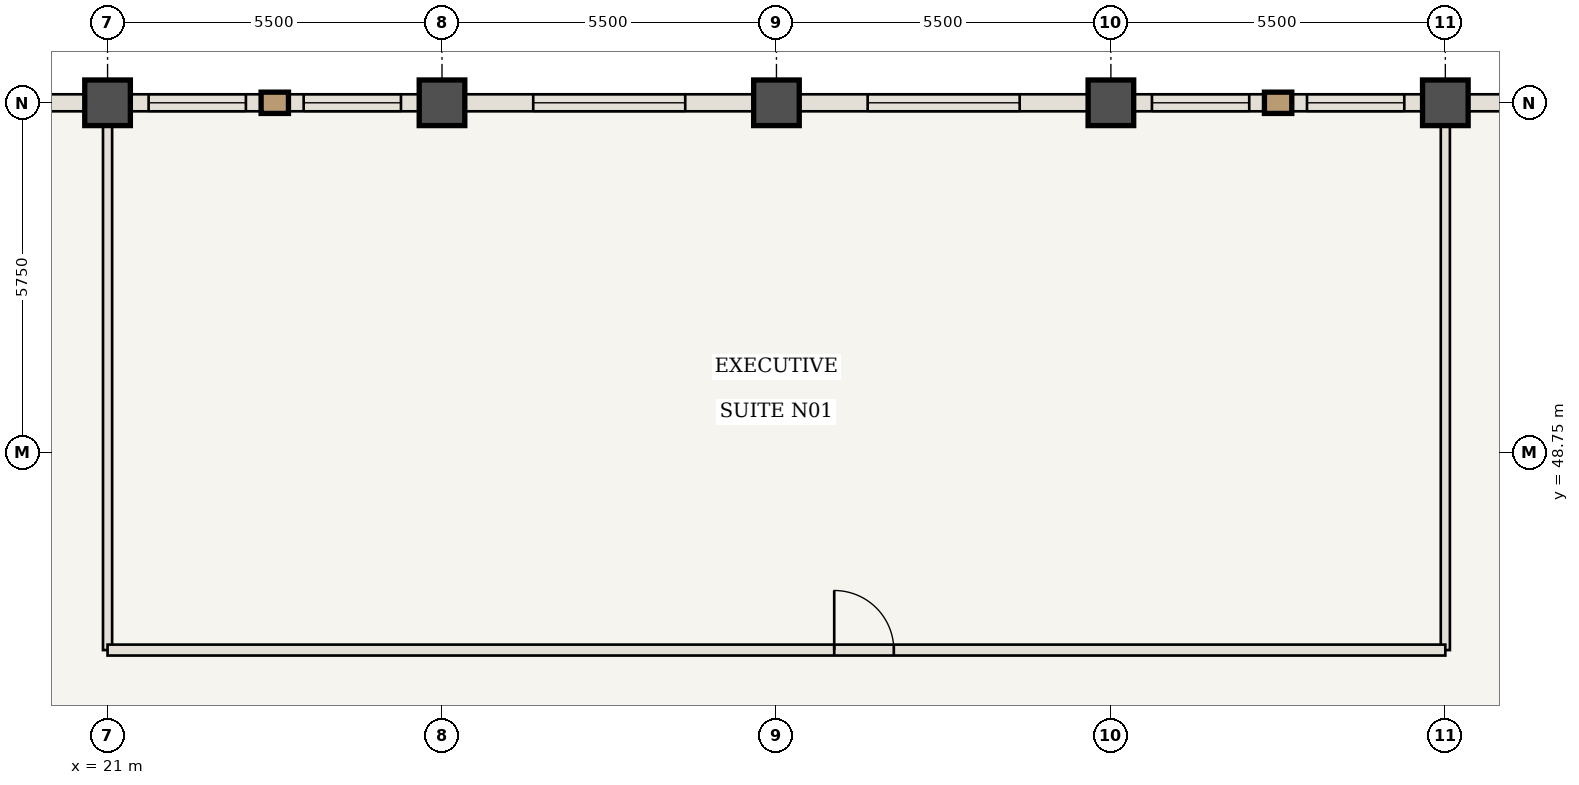
"""IFC4 building model, lengths in metres.
Left out: names, types, materials, properties, quantities, classifications, styles, units other than length and angle.
Written with IfcOpenShell. Run it as: python <this file> out.ifc"""

import sys

from ifc_helpers import new_model, si_unit, direction, frame, frame_2d, origin, origin_2d, place, context, subcontext, project, spatial, rectangle, extrude, element, fill, save


model = new_model("IFC4")
c1 = context("Model", 3, precision=1e-05, world=origin(), true_north=direction((0.0, 1.0)))
c2 = subcontext(c1, "Body", "Model", "MODEL_VIEW")
j1 = project(units=[si_unit("LENGTHUNIT", "METRE"), si_unit("PLANEANGLEUNIT", "RADIAN")], contexts=[c1])
p1 = place(None, origin())
s1 = spatial("IfcSite", under=j1, at=p1, CompositionType="ELEMENT")
p2 = place(p1, origin())
s2 = spatial("IfcBuilding", under=s1, at=p2, CompositionType="ELEMENT")
p3 = place(p2, frame((0.0, 0.0, 300.65)))
s3 = spatial("IfcBuildingStorey", under=s2, at=p3, CompositionType="ELEMENT", Elevation=300.65)
for number, where, z_axis, x_axis in (
    (1, (21.0, 54.5, 0.0), (0.0, 0.0, 1.0), (1.0, 0.0, 0.0)),
    (2, (26.5, 54.5, 0.0), (0.0, 0.0, 1.0), (1.0, 0.0, 0.0)),
    (3, (32.0, 54.5, 0.0), (0.0, 0.0, 1.0), (1.0, 0.0, 0.0)),
    (4, (37.5, 54.5, 0.0), (0.0, 0.0, 1.0), (1.0, 0.0, 0.0)),
    (5, (43.0, 54.5, 0.0), (0.0, 0.0, 1.0), (1.0, 0.0, 0.0)),
):
    element("IfcColumn", number, at=place(p3, frame(where, z_axis=z_axis, x_axis=x_axis)), inside=s3, PredefinedType="COLUMN", context=c2, shape_type="SweptSolid", body=[
        extrude(rectangle(XDim=0.75, YDim=0.75, at=origin_2d()), origin(), (0.0, 0.0, 1.0), 3.85),
    ])
for number, where, z_axis, x_axis in (
    (6, (21.0, 45.5, 0.0), (0.0, 0.0, 1.0), (0.0, 1.0, 0.0)),
    (7, (43.0, 45.5, 0.0), (0.0, 0.0, 1.0), (0.0, 1.0, 0.0)),
):
    element("IfcWall", number, at=place(p3, frame(where, z_axis=z_axis, x_axis=x_axis)), inside=s3, PredefinedType="STANDARD", context=c2, shape_type="SweptSolid", body=[
        extrude(rectangle(XDim=8.94, YDim=0.15, at=frame_2d((4.47, 0.0))), origin(), (0.0, 0.0, 1.0), 3.685),
    ])
p4 = place(p3, frame((21.0, 45.5, 0.0), z_axis=(0.0, 0.0, 1.0), x_axis=(1.0, 0.0, 0.0)))
e8 = element("IfcWall", 8, at=p4, inside=s3, PredefinedType="STANDARD", context=c2, shape_type="SweptSolid", body=[
    extrude(rectangle(XDim=22.0, YDim=0.18, at=frame_2d((11.0, 0.0))), origin(), (0.0, 0.0, 1.0), 3.685),
])
p5 = place(p4, frame((11.95, 0.0, 0.0)))
e9 = element("IfcOpeningElement", 9, at=p5, cuts=e8, PredefinedType="OPENING", context=c2, shape_type="SweptSolid", body=[
    extrude(rectangle(XDim=0.98, YDim=2.2, at=frame_2d((0.49, 1.1))), frame((0.0, 0.1, 0.0), z_axis=(0.0, -1.0, 0.0), x_axis=(1.0, 0.0, 0.0)), (0.0, 0.0, 1.0), 0.2),
])
p6 = place(p3, frame((15.5, 54.5, 0.0), z_axis=(0.0, 0.0, 1.0), x_axis=(1.0, 0.0, 0.0)))
e10 = element("IfcWall", 10, at=p6, inside=s3, PredefinedType="USERDEFINED", context=c2, shape_type="SweptSolid", body=[
    extrude(rectangle(XDim=5.5, YDim=0.28, at=frame_2d((2.75, 0.0))), origin(), (0.0, 0.0, 1.0), 2.985),
])
p7 = place(p3, frame((21.0, 54.5, 0.0), z_axis=(0.0, 0.0, 1.0), x_axis=(1.0, 0.0, 0.0)))
e11 = element("IfcWall", 11, at=p7, inside=s3, PredefinedType="USERDEFINED", context=c2, shape_type="SweptSolid", body=[
    extrude(rectangle(XDim=5.5, YDim=0.28, at=frame_2d((2.75, 0.0))), origin(), (0.0, 0.0, 1.0), 2.985),
])
p8 = place(p7, frame((0.675, 0.0, 0.85)))
e12 = element("IfcOpeningElement", 12, at=p8, cuts=e11, PredefinedType="OPENING", context=c2, shape_type="SweptSolid", body=[
    extrude(rectangle(XDim=1.6, YDim=1.935, at=frame_2d((0.8, 0.968))), frame((0.0, 0.15, 0.0), z_axis=(0.0, -1.0, 0.0), x_axis=(1.0, 0.0, 0.0)), (0.0, 0.0, 1.0), 0.3),
])
p9 = place(p7, frame((3.225, 0.0, 0.85)))
e13 = element("IfcOpeningElement", 13, at=p9, cuts=e11, PredefinedType="OPENING", context=c2, shape_type="SweptSolid", body=[
    extrude(rectangle(XDim=1.6, YDim=1.935, at=frame_2d((0.8, 0.968))), frame((0.0, 0.15, 0.0), z_axis=(0.0, -1.0, 0.0), x_axis=(1.0, 0.0, 0.0)), (0.0, 0.0, 1.0), 0.3),
])
p10 = place(p3, frame((26.5, 54.5, 0.0), z_axis=(0.0, 0.0, 1.0), x_axis=(1.0, 0.0, 0.0)))
e14 = element("IfcWall", 14, at=p10, inside=s3, PredefinedType="USERDEFINED", context=c2, shape_type="SweptSolid", body=[
    extrude(rectangle(XDim=5.5, YDim=0.28, at=frame_2d((2.75, 0.0))), origin(), (0.0, 0.0, 1.0), 2.985),
])
p11 = place(p10, frame((1.5, 0.0, 0.85)))
e15 = element("IfcOpeningElement", 15, at=p11, cuts=e14, PredefinedType="OPENING", context=c2, shape_type="SweptSolid", body=[
    extrude(rectangle(XDim=2.5, YDim=1.935, at=frame_2d((1.25, 0.968))), frame((0.0, 0.15, 0.0), z_axis=(0.0, -1.0, 0.0), x_axis=(1.0, 0.0, 0.0)), (0.0, 0.0, 1.0), 0.3),
])
p12 = place(p3, frame((32.0, 54.5, 0.0), z_axis=(0.0, 0.0, 1.0), x_axis=(1.0, 0.0, 0.0)))
e16 = element("IfcWall", 16, at=p12, inside=s3, PredefinedType="USERDEFINED", context=c2, shape_type="SweptSolid", body=[
    extrude(rectangle(XDim=5.5, YDim=0.28, at=frame_2d((2.75, 0.0))), origin(), (0.0, 0.0, 1.0), 2.985),
])
p13 = place(p12, frame((1.5, 0.0, 0.85)))
e17 = element("IfcOpeningElement", 17, at=p13, cuts=e16, PredefinedType="OPENING", context=c2, shape_type="SweptSolid", body=[
    extrude(rectangle(XDim=2.5, YDim=1.935, at=frame_2d((1.25, 0.968))), frame((0.0, 0.15, 0.0), z_axis=(0.0, -1.0, 0.0), x_axis=(1.0, 0.0, 0.0)), (0.0, 0.0, 1.0), 0.3),
])
p14 = place(p3, frame((37.5, 54.5, 0.0), z_axis=(0.0, 0.0, 1.0), x_axis=(1.0, 0.0, 0.0)))
e18 = element("IfcWall", 18, at=p14, inside=s3, PredefinedType="USERDEFINED", context=c2, shape_type="SweptSolid", body=[
    extrude(rectangle(XDim=5.5, YDim=0.28, at=frame_2d((2.75, 0.0))), origin(), (0.0, 0.0, 1.0), 2.985),
])
p15 = place(p14, frame((0.675, 0.0, 0.85)))
e19 = element("IfcOpeningElement", 19, at=p15, cuts=e18, PredefinedType="OPENING", context=c2, shape_type="SweptSolid", body=[
    extrude(rectangle(XDim=1.6, YDim=1.935, at=frame_2d((0.8, 0.968))), frame((0.0, 0.15, 0.0), z_axis=(0.0, -1.0, 0.0), x_axis=(1.0, 0.0, 0.0)), (0.0, 0.0, 1.0), 0.3),
])
p16 = place(p14, frame((3.225, 0.0, 0.85)))
e20 = element("IfcOpeningElement", 20, at=p16, cuts=e18, PredefinedType="OPENING", context=c2, shape_type="SweptSolid", body=[
    extrude(rectangle(XDim=1.6, YDim=1.935, at=frame_2d((0.8, 0.968))), frame((0.0, 0.15, 0.0), z_axis=(0.0, -1.0, 0.0), x_axis=(1.0, 0.0, 0.0)), (0.0, 0.0, 1.0), 0.3),
])
p17 = place(p3, frame((43.0, 54.5, 0.0), z_axis=(0.0, 0.0, 1.0), x_axis=(1.0, 0.0, 0.0)))
e21 = element("IfcWall", 21, at=p17, inside=s3, PredefinedType="USERDEFINED", context=c2, shape_type="SweptSolid", body=[
    extrude(rectangle(XDim=5.5, YDim=0.28, at=frame_2d((2.75, 0.0))), origin(), (0.0, 0.0, 1.0), 2.985),
])
p18 = place(p5, origin())
e22 = element("IfcDoor", 22, at=p18, inside=s3, OperationType="SINGLE_SWING_LEFT", PredefinedType="DOOR", context=c2, shape_type="SweptSolid", body=[
    extrude(rectangle(XDim=0.98, YDim=2.2, at=frame_2d((0.49, 1.1))), frame((0.0, 0.025, 0.0), z_axis=(0.0, -1.0, 0.0), x_axis=(1.0, 0.0, 0.0)), (0.0, 0.0, 1.0), 0.05),
])
fill(e9, e22)
p19 = place(p8, origin())
e23 = element("IfcWindow", 23, at=p19, inside=s3, PartitioningType="SINGLE_PANEL", PredefinedType="WINDOW", context=c2, shape_type="SweptSolid", body=[
    extrude(rectangle(XDim=1.6, YDim=1.935, at=frame_2d((0.8, 0.968))), frame((0.0, 0.03, 0.0), z_axis=(0.0, -1.0, 0.0), x_axis=(1.0, 0.0, 0.0)), (0.0, 0.0, 1.0), 0.06),
])
fill(e12, e23)
p20 = place(p9, origin())
e24 = element("IfcWindow", 24, at=p20, inside=s3, PartitioningType="SINGLE_PANEL", PredefinedType="WINDOW", context=c2, shape_type="SweptSolid", body=[
    extrude(rectangle(XDim=1.6, YDim=1.935, at=frame_2d((0.8, 0.968))), frame((0.0, 0.03, 0.0), z_axis=(0.0, -1.0, 0.0), x_axis=(1.0, 0.0, 0.0)), (0.0, 0.0, 1.0), 0.06),
])
fill(e13, e24)
p21 = place(p11, origin())
e25 = element("IfcWindow", 25, at=p21, inside=s3, PartitioningType="SINGLE_PANEL", PredefinedType="WINDOW", context=c2, shape_type="SweptSolid", body=[
    extrude(rectangle(XDim=2.5, YDim=1.935, at=frame_2d((1.25, 0.968))), frame((0.0, 0.03, 0.0), z_axis=(0.0, -1.0, 0.0), x_axis=(1.0, 0.0, 0.0)), (0.0, 0.0, 1.0), 0.06),
])
fill(e15, e25)
p22 = place(p13, origin())
e26 = element("IfcWindow", 26, at=p22, inside=s3, PartitioningType="SINGLE_PANEL", PredefinedType="WINDOW", context=c2, shape_type="SweptSolid", body=[
    extrude(rectangle(XDim=2.5, YDim=1.935, at=frame_2d((1.25, 0.968))), frame((0.0, 0.03, 0.0), z_axis=(0.0, -1.0, 0.0), x_axis=(1.0, 0.0, 0.0)), (0.0, 0.0, 1.0), 0.06),
])
fill(e17, e26)
p23 = place(p15, origin())
e27 = element("IfcWindow", 27, at=p23, inside=s3, PartitioningType="SINGLE_PANEL", PredefinedType="WINDOW", context=c2, shape_type="SweptSolid", body=[
    extrude(rectangle(XDim=1.6, YDim=1.935, at=frame_2d((0.8, 0.968))), frame((0.0, 0.03, 0.0), z_axis=(0.0, -1.0, 0.0), x_axis=(1.0, 0.0, 0.0)), (0.0, 0.0, 1.0), 0.06),
])
fill(e19, e27)
p24 = place(p16, origin())
e28 = element("IfcWindow", 28, at=p24, inside=s3, PartitioningType="SINGLE_PANEL", PredefinedType="WINDOW", context=c2, shape_type="SweptSolid", body=[
    extrude(rectangle(XDim=1.6, YDim=1.935, at=frame_2d((0.8, 0.968))), frame((0.0, 0.03, 0.0), z_axis=(0.0, -1.0, 0.0), x_axis=(1.0, 0.0, 0.0)), (0.0, 0.0, 1.0), 0.06),
])
fill(e20, e28)
save(model, sys.argv[1])
